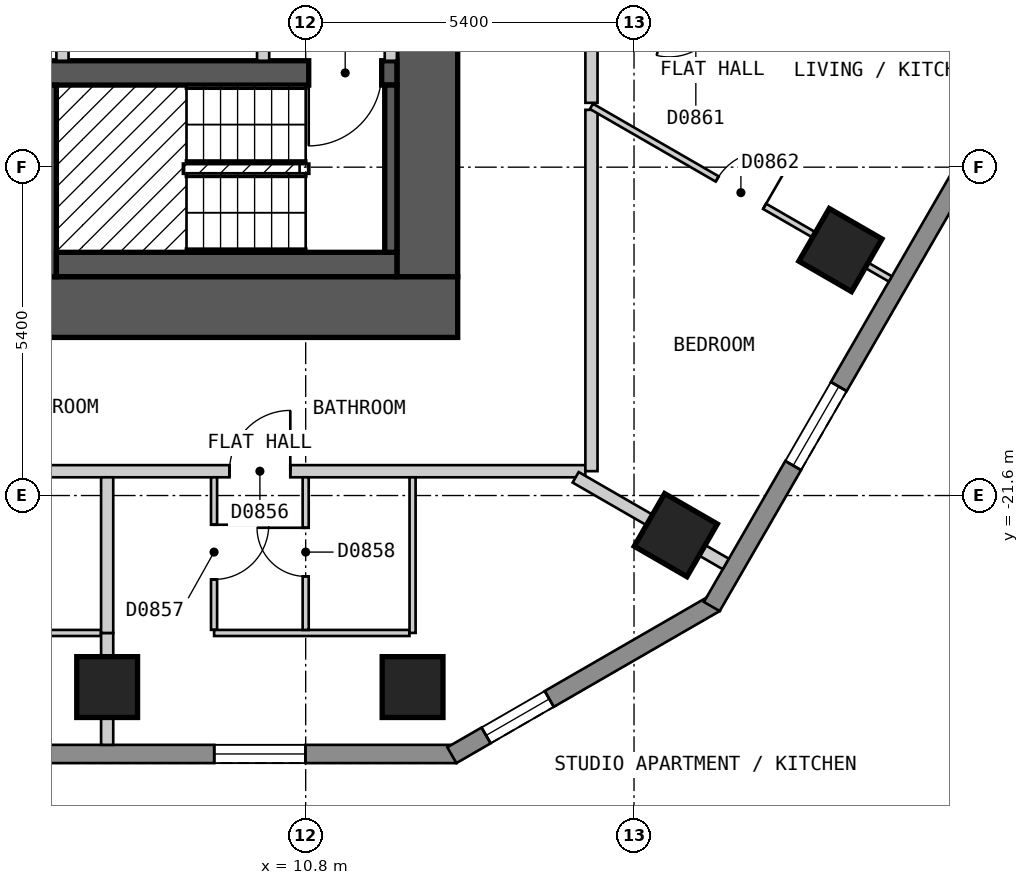
"""IFC4 building model, lengths in metres.
Left out: names, types, materials, properties, quantities, classifications, styles, units other than length and angle.
Written with IfcOpenShell. Run it as: python <this file> out.ifc"""

import sys

from ifc_helpers import new_model, si_unit, direction, frame, frame_2d, origin, origin_2d, place, context, subcontext, project, spatial, polyline, rectangle, outline, extrude, element, fill, save


model = new_model("IFC4")
c1 = context("Model", 3, precision=1e-05, world=origin(), true_north=direction((0.0, 1.0)))
c2 = subcontext(c1, "Body", "Model", "MODEL_VIEW")
j1 = project(units=[si_unit("LENGTHUNIT", "METRE"), si_unit("PLANEANGLEUNIT", "RADIAN")], contexts=[c1])
p1 = place(None, origin())
s1 = spatial("IfcSite", under=j1, at=p1, CompositionType="ELEMENT")
p2 = place(p1, origin())
s2 = spatial("IfcBuilding", under=s1, at=p2, CompositionType="ELEMENT")
p3 = place(p2, frame((0.0, 0.0, 84.0)))
s3 = spatial("IfcBuildingStorey", under=s2, at=p3, CompositionType="ELEMENT", Elevation=84.0)
for number, where, z_axis, x_axis in (
    (1, (7.535, -24.75, 0.0), (0.0, 0.0, 1.0), (1.0, 0.0, 0.0)),
    (2, (12.558, -24.75, 0.0), (0.0, 0.0, 1.0), (1.0, 0.0, 0.0)),
    (3, (16.887, -22.251, 0.0), (0.0, 0.0, 1.0), (0.5, 0.866, 0.0)),
    (4, (19.594, -17.563, 0.0), (0.0, 0.0, 1.0), (0.5, 0.866, 0.0)),
):
    element("IfcColumn", number, at=place(p3, frame(where, z_axis=z_axis, x_axis=x_axis)), inside=s3, PredefinedType="COLUMN", context=c2, shape_type="SweptSolid", body=[
        extrude(rectangle(XDim=1.0, YDim=1.0, at=origin_2d()), origin(), (0.0, 0.0, 1.0), 3.0),
    ])
p4 = place(p3, frame((-13.3, -18.5, 0.0), z_axis=(0.0, 0.0, 1.0), x_axis=(1.0, 0.0, 0.0)))
e5 = element("IfcWall", 5, at=p4, inside=s3, PredefinedType="SHEAR", context=c2, shape_type="SweptSolid", body=[
    extrude(rectangle(XDim=26.6, YDim=1.0, at=frame_2d((13.3, 0.0))), origin(), (0.0, 0.0, 1.0), 2.7),
])
p5 = place(p3, frame((12.8, -18.0, 0.0), z_axis=(0.0, 0.0, 1.0), x_axis=(0.0, 1.0, 0.0)))
e6 = element("IfcWall", 6, at=p5, inside=s3, PredefinedType="SHEAR", context=c2, shape_type="SweptSolid", body=[
    extrude(rectangle(XDim=12.0, YDim=1.0, at=frame_2d((6.0, 0.0))), origin(), (0.0, 0.0, 1.0), 2.7),
])
p6 = place(p3, frame((-12.3, -14.65, 0.0), z_axis=(0.0, 0.0, 1.0), x_axis=(1.0, 0.0, 0.0)))
e7 = element("IfcWall", 7, at=p6, inside=s3, PredefinedType="SHEAR", context=c2, shape_type="SweptSolid", body=[
    extrude(rectangle(XDim=24.6, YDim=0.4, at=frame_2d((12.3, 0.0))), origin(), (0.0, 0.0, 1.0), 2.7),
])
p7 = place(p6, frame((1.5, 0.0, 0.0), z_axis=(0.0, 0.0, 1.0), x_axis=(-1.0, 0.0, 0.0)))
e8 = element("IfcOpeningElement", 8, at=p7, cuts=e7, PredefinedType="OPENING", context=c2, shape_type="SweptSolid", body=[
    extrude(rectangle(XDim=1.2, YDim=2.1, at=frame_2d((0.6, 1.05))), frame((0.0, 0.21, 0.0), z_axis=(0.0, -1.0, 0.0), x_axis=(1.0, 0.0, 0.0)), (0.0, 0.0, 1.0), 0.42),
])
p8 = place(p6, frame((24.35, 0.0, 0.0), z_axis=(0.0, 0.0, 1.0), x_axis=(-1.0, 0.0, 0.0)))
e9 = element("IfcOpeningElement", 9, at=p8, cuts=e7, PredefinedType="OPENING", context=c2, shape_type="SweptSolid", body=[
    extrude(rectangle(XDim=1.2, YDim=2.1, at=frame_2d((0.6, 1.05))), frame((0.0, 0.21, 0.0), z_axis=(0.0, -1.0, 0.0), x_axis=(1.0, 0.0, 0.0)), (0.0, 0.0, 1.0), 0.42),
])
p9 = place(p6, frame((16.45, 0.0, 0.0), z_axis=(0.0, 0.0, 1.0), x_axis=(-1.0, 0.0, 0.0)))
e10 = element("IfcOpeningElement", 10, at=p9, cuts=e7, PredefinedType="OPENING", context=c2, shape_type="SweptSolid", body=[
    extrude(rectangle(XDim=0.9, YDim=2.1, at=frame_2d((0.45, 1.05))), frame((0.0, 0.21, 0.0), z_axis=(0.0, -1.0, 0.0), x_axis=(1.0, 0.0, 0.0)), (0.0, 0.0, 1.0), 0.42),
])
p10 = place(p6, frame((18.25, 0.0, 0.0), z_axis=(0.0, 0.0, 1.0), x_axis=(-1.0, 0.0, 0.0)))
e11 = element("IfcOpeningElement", 11, at=p10, cuts=e7, PredefinedType="OPENING", context=c2, shape_type="SweptSolid", body=[
    extrude(rectangle(XDim=0.9, YDim=2.1, at=frame_2d((0.45, 1.05))), frame((0.0, 0.21, 0.0), z_axis=(0.0, -1.0, 0.0), x_axis=(1.0, 0.0, 0.0)), (0.0, 0.0, 1.0), 0.42),
])
p11 = place(p3, frame((6.5, -18.0, 0.0), z_axis=(0.0, 0.0, 1.0), x_axis=(0.0, 1.0, 0.0)))
e12 = element("IfcWall", 12, at=p11, inside=s3, PredefinedType="SHEAR", context=c2, shape_type="SweptSolid", body=[
    extrude(rectangle(XDim=3.15, YDim=0.4, at=frame_2d((1.575, 0.0))), origin(), (0.0, 0.0, 1.0), 2.7),
])
p12 = place(p3, frame((-13.279, -25.85, 0.0), z_axis=(0.0, 0.0, 1.0), x_axis=(1.0, 0.0, 0.0)))
e13 = element("IfcWall", 13, at=p12, inside=s3, PredefinedType="SOLIDWALL", context=c2, shape_type="SweptSolid", body=[
    extrude(outline(polyline([(0.0, -0.15), (26.558, -0.15), (26.478, 0.15), (0.08, 0.15), (0.0, -0.15)])), origin(), (0.0, 0.0, 1.0), 2.7),
])
p13 = place(p12, frame((2.483, 0.0, 0.15)))
e14 = element("IfcOpeningElement", 14, at=p13, cuts=e13, PredefinedType="OPENING", context=c2, shape_type="SweptSolid", body=[
    extrude(rectangle(XDim=1.5, YDim=2.1, at=frame_2d((0.75, 1.05))), frame((0.0, 0.16, 0.0), z_axis=(0.0, -1.0, 0.0), x_axis=(1.0, 0.0, 0.0)), (0.0, 0.0, 1.0), 0.32),
])
p14 = place(p12, frame((7.507, 0.0, 0.15)))
e15 = element("IfcOpeningElement", 15, at=p14, cuts=e13, PredefinedType="OPENING", context=c2, shape_type="SweptSolid", body=[
    extrude(rectangle(XDim=1.5, YDim=2.1, at=frame_2d((0.75, 1.05))), frame((0.0, 0.16, 0.0), z_axis=(0.0, -1.0, 0.0), x_axis=(1.0, 0.0, 0.0)), (0.0, 0.0, 1.0), 0.32),
])
p15 = place(p12, frame((12.529, 0.0, 0.15)))
e16 = element("IfcOpeningElement", 16, at=p15, cuts=e13, PredefinedType="OPENING", context=c2, shape_type="SweptSolid", body=[
    extrude(rectangle(XDim=1.5, YDim=2.1, at=frame_2d((0.75, 1.05))), frame((0.0, 0.16, 0.0), z_axis=(0.0, -1.0, 0.0), x_axis=(1.0, 0.0, 0.0)), (0.0, 0.0, 1.0), 0.32),
])
p16 = place(p12, frame((17.553, 0.0, 0.15)))
e17 = element("IfcOpeningElement", 17, at=p16, cuts=e13, PredefinedType="OPENING", context=c2, shape_type="SweptSolid", body=[
    extrude(rectangle(XDim=1.5, YDim=2.1, at=frame_2d((0.75, 1.05))), frame((0.0, 0.16, 0.0), z_axis=(0.0, -1.0, 0.0), x_axis=(1.0, 0.0, 0.0)), (0.0, 0.0, 1.0), 0.32),
])
p17 = place(p12, frame((22.575, 0.0, 0.15)))
e18 = element("IfcOpeningElement", 18, at=p17, cuts=e13, PredefinedType="OPENING", context=c2, shape_type="SweptSolid", body=[
    extrude(rectangle(XDim=1.5, YDim=2.1, at=frame_2d((0.75, 1.05))), frame((0.0, 0.16, 0.0), z_axis=(0.0, -1.0, 0.0), x_axis=(1.0, 0.0, 0.0)), (0.0, 0.0, 1.0), 0.32),
])
p18 = place(p3, frame((13.204, -25.87, 0.0), z_axis=(0.0, 0.0, 1.0), x_axis=(0.866010750942, 0.50002537861, 0.0)))
e19 = element("IfcWall", 19, at=p18, inside=s3, PredefinedType="SOLIDWALL", context=c2, shape_type="SweptSolid", body=[
    extrude(outline(polyline([(0.0, -0.15), (5.0, -0.15), (4.919, 0.15), (0.08, 0.15), (0.0, -0.15)])), origin(), (0.0, 0.0, 1.0), 2.7),
])
p19 = place(p18, frame((0.65, 0.0, 0.15)))
e20 = element("IfcOpeningElement", 20, at=p19, cuts=e19, PredefinedType="OPENING", context=c2, shape_type="SweptSolid", body=[
    extrude(rectangle(XDim=1.2, YDim=2.1, at=frame_2d((0.6, 1.05))), frame((0.0, 0.16, 0.0), z_axis=(0.0, -1.0, 0.0), x_axis=(1.0, 0.0, 0.0)), (0.0, 0.0, 1.0), 0.32),
])
p20 = place(p3, frame((17.479, -23.425, 0.0), z_axis=(0.0, 0.0, 1.0), x_axis=(0.500035407905, 0.866004960056, 0.0)))
e21 = element("IfcWall", 21, at=p20, inside=s3, PredefinedType="SOLIDWALL", context=c2, shape_type="SweptSolid", body=[
    extrude(outline(polyline([(0.0, -0.15), (23.094, -0.15), (23.014, 0.15), (0.08, 0.15), (0.0, -0.15)])), origin(), (0.0, 0.0, 1.0), 2.7),
])
p21 = place(p20, frame((2.677, 0.0, 0.15)))
e22 = element("IfcOpeningElement", 22, at=p21, cuts=e21, PredefinedType="OPENING", context=c2, shape_type="SweptSolid", body=[
    extrude(rectangle(XDim=1.5, YDim=2.1, at=frame_2d((0.75, 1.05))), frame((0.0, 0.16, 0.0), z_axis=(0.0, -1.0, 0.0), x_axis=(1.0, 0.0, 0.0)), (0.0, 0.0, 1.0), 0.32),
])
p22 = place(p20, frame((8.091, 0.0, 0.15)))
e23 = element("IfcOpeningElement", 23, at=p22, cuts=e21, PredefinedType="OPENING", context=c2, shape_type="SweptSolid", body=[
    extrude(rectangle(XDim=1.5, YDim=2.1, at=frame_2d((0.75, 1.05))), frame((0.0, 0.16, 0.0), z_axis=(0.0, -1.0, 0.0), x_axis=(1.0, 0.0, 0.0)), (0.0, 0.0, 1.0), 0.32),
])
p23 = place(p20, frame((13.504, 0.0, 0.15)))
e24 = element("IfcOpeningElement", 24, at=p23, cuts=e21, PredefinedType="OPENING", context=c2, shape_type="SweptSolid", body=[
    extrude(rectangle(XDim=1.5, YDim=2.1, at=frame_2d((0.75, 1.05))), frame((0.0, 0.16, 0.0), z_axis=(0.0, -1.0, 0.0), x_axis=(1.0, 0.0, 0.0)), (0.0, 0.0, 1.0), 0.32),
])
p24 = place(p20, frame((18.917, 0.0, 0.15)))
e25 = element("IfcOpeningElement", 25, at=p24, cuts=e21, PredefinedType="OPENING", context=c2, shape_type="SweptSolid", body=[
    extrude(rectangle(XDim=1.5, YDim=2.1, at=frame_2d((0.75, 1.05))), frame((0.0, 0.16, 0.0), z_axis=(0.0, -1.0, 0.0), x_axis=(1.0, 0.0, 0.0)), (0.0, 0.0, 1.0), 0.32),
])
p25 = place(p3, frame((15.5, -13.239, 0.0), z_axis=(0.0, 0.0, 1.0), x_axis=(0.0, -1.0, 0.0)))
e26 = element("IfcWall", 26, at=p25, inside=s3, PredefinedType="PARTITIONING", context=c2, shape_type="SweptSolid", body=[
    extrude(rectangle(XDim=1.903, YDim=0.2, at=frame_2d((0.952, 0.0))), origin(), (0.0, 0.0, 1.0), 2.7),
])
p26 = place(p3, frame((-15.499, -21.2, 0.0), z_axis=(0.0, 0.0, 1.0), x_axis=(1.0, 0.0, 0.0)))
e27 = element("IfcWall", 27, at=p26, inside=s3, PredefinedType="PARTITIONING", context=c2, shape_type="SweptSolid", body=[
    extrude(rectangle(XDim=30.898, YDim=0.2, at=frame_2d((15.449, 0.0))), origin(), (0.0, 0.0, 1.0), 2.7),
])
p27 = place(p26, frame((4.954, 0.0, 0.0)))
e28 = element("IfcOpeningElement", 28, at=p27, cuts=e27, PredefinedType="OPENING", context=c2, shape_type="SweptSolid", body=[
    extrude(rectangle(XDim=1.0, YDim=2.1, at=frame_2d((0.5, 1.05))), frame((0.0, 0.11, 0.0), z_axis=(0.0, -1.0, 0.0), x_axis=(1.0, 0.0, 0.0)), (0.0, 0.0, 1.0), 0.22),
])
p28 = place(p26, frame((20.023, 0.0, 0.0)))
e29 = element("IfcOpeningElement", 29, at=p28, cuts=e27, PredefinedType="OPENING", context=c2, shape_type="SweptSolid", body=[
    extrude(rectangle(XDim=1.0, YDim=2.1, at=frame_2d((0.5, 1.05))), frame((0.0, 0.11, 0.0), z_axis=(0.0, -1.0, 0.0), x_axis=(1.0, 0.0, 0.0)), (0.0, 0.0, 1.0), 0.22),
])
p29 = place(p26, frame((25.046, 0.0, 0.0)))
e30 = element("IfcOpeningElement", 30, at=p29, cuts=e27, PredefinedType="OPENING", context=c2, shape_type="SweptSolid", body=[
    extrude(rectangle(XDim=1.0, YDim=2.1, at=frame_2d((0.5, 1.05))), frame((0.0, 0.11, 0.0), z_axis=(0.0, -1.0, 0.0), x_axis=(1.0, 0.0, 0.0)), (0.0, 0.0, 1.0), 0.22),
])
p30 = place(p3, frame((15.5, -21.199, 0.0), z_axis=(0.0, 0.0, 1.0), x_axis=(0.0, 1.0, 0.0)))
e31 = element("IfcWall", 31, at=p30, inside=s3, PredefinedType="PARTITIONING", context=c2, shape_type="SweptSolid", body=[
    extrude(rectangle(XDim=5.942, YDim=0.2, at=frame_2d((2.971, 0.0))), origin(), (0.0, 0.0, 1.0), 2.7),
])
p31 = place(p3, frame((9.293, -21.3, 0.0), z_axis=(0.0, 0.0, 1.0), x_axis=(0.0, -1.0, 0.0)))
e32 = element("IfcWall", 32, at=p31, inside=s3, PredefinedType="PARTITIONING", context=c2, shape_type="SweptSolid", body=[
    extrude(rectangle(XDim=2.509, YDim=0.1, at=frame_2d((1.254, 0.0))), origin(), (0.0, 0.0, 1.0), 2.7),
])
p32 = place(p31, frame((0.78, 0.0, 0.0)))
e33 = element("IfcOpeningElement", 33, at=p32, cuts=e32, PredefinedType="OPENING", context=c2, shape_type="SweptSolid", body=[
    extrude(rectangle(XDim=0.9, YDim=2.1, at=frame_2d((0.45, 1.05))), frame((0.0, 0.06, 0.0), z_axis=(0.0, -1.0, 0.0), x_axis=(1.0, 0.0, 0.0)), (0.0, 0.0, 1.0), 0.12),
])
p33 = place(p3, frame((15.5, -15.2, 0.0), z_axis=(0.0, 0.0, 1.0), x_axis=(0.866035181374, -0.499983064336, 0.0)))
e34 = element("IfcWall", 34, at=p33, inside=s3, PredefinedType="PARTITIONING", context=c2, shape_type="SweptSolid", body=[
    extrude(rectangle(XDim=5.677, YDim=0.1, at=frame_2d((2.838, 0.0))), origin(), (0.0, 0.0, 1.0), 2.7),
])
p34 = place(p33, frame((2.388, 0.0, 0.0)))
e35 = element("IfcOpeningElement", 35, at=p34, cuts=e34, PredefinedType="OPENING", context=c2, shape_type="SweptSolid", body=[
    extrude(rectangle(XDim=0.9, YDim=2.1, at=frame_2d((0.45, 1.05))), frame((0.0, 0.06, 0.0), z_axis=(0.0, -1.0, 0.0), x_axis=(1.0, 0.0, 0.0)), (0.0, 0.0, 1.0), 0.12),
])
p35 = place(p3, frame((4.271, -23.86, 0.0), z_axis=(0.0, 0.0, 1.0), x_axis=(1.0, 0.0, 0.0)))
e36 = element("IfcWall", 36, at=p35, inside=s3, PredefinedType="PARTITIONING", context=c2, shape_type="SweptSolid", body=[
    extrude(rectangle(XDim=3.164, YDim=0.1, at=frame_2d((1.582, 0.0))), origin(), (0.0, 0.0, 1.0), 2.7),
])
p36 = place(p3, frame((9.294, -23.86, 0.0), z_axis=(0.0, 0.0, 1.0), x_axis=(1.0, 0.0, 0.0)))
e37 = element("IfcWall", 37, at=p36, inside=s3, PredefinedType="PARTITIONING", context=c2, shape_type="SweptSolid", body=[
    extrude(rectangle(XDim=3.213, YDim=0.1, at=frame_2d((1.606, 0.0))), origin(), (0.0, 0.0, 1.0), 2.7),
])
p37 = place(p3, frame((10.8, -23.81, 0.0), z_axis=(0.0, 0.0, 1.0), x_axis=(0.0, 1.0, 0.0)))
e38 = element("IfcWall", 38, at=p37, inside=s3, PredefinedType="PARTITIONING", context=c2, shape_type="SweptSolid", body=[
    extrude(rectangle(XDim=2.51, YDim=0.1, at=frame_2d((1.255, 0.0))), origin(), (0.0, 0.0, 1.0), 2.7),
])
p38 = place(p37, frame((0.88, 0.0, 0.0)))
e39 = element("IfcOpeningElement", 39, at=p38, cuts=e38, PredefinedType="OPENING", context=c2, shape_type="SweptSolid", body=[
    extrude(rectangle(XDim=0.8, YDim=2.1, at=frame_2d((0.4, 1.05))), frame((0.0, 0.06, 0.0), z_axis=(0.0, -1.0, 0.0), x_axis=(1.0, 0.0, 0.0)), (0.0, 0.0, 1.0), 0.12),
])
p39 = place(p3, frame((12.558, -23.859, 0.0), z_axis=(0.0, 0.0, 1.0), x_axis=(0.0, 1.0, 0.0)))
e40 = element("IfcWall", 40, at=p39, inside=s3, PredefinedType="PARTITIONING", context=c2, shape_type="SweptSolid", body=[
    extrude(rectangle(XDim=2.559, YDim=0.1, at=frame_2d((1.279, 0.0))), origin(), (0.0, 0.0, 1.0), 2.7),
])
p40 = place(p3, frame((7.535, -23.86, 0.0), z_axis=(0.0, 0.0, 1.0), x_axis=(0.0, -1.0, 0.0)))
e41 = element("IfcWall", 41, at=p40, inside=s3, PredefinedType="PARTITIONING", context=c2, shape_type="SweptSolid", body=[
    extrude(rectangle(XDim=1.84, YDim=0.2, at=frame_2d((0.92, 0.0))), origin(), (0.0, 0.0, 1.0), 2.7),
])
p41 = place(p3, frame((15.24, -21.3, 0.0), z_axis=(0.0, 0.0, 1.0), x_axis=(0.866090043625, -0.499888023795, 0.0)))
e42 = element("IfcWall", 42, at=p41, inside=s3, PredefinedType="PARTITIONING", context=c2, shape_type="SweptSolid", body=[
    extrude(rectangle(XDim=2.851, YDim=0.2, at=frame_2d((1.425, 0.0))), origin(), (0.0, 0.0, 1.0), 2.7),
])
p42 = place(p3, frame((7.535, -23.86, 0.0), z_axis=(0.0, 0.0, 1.0), x_axis=(0.0, 1.0, 0.0)))
e43 = element("IfcWall", 43, at=p42, inside=s3, PredefinedType="PARTITIONING", context=c2, shape_type="SweptSolid", body=[
    extrude(rectangle(XDim=2.56, YDim=0.2, at=frame_2d((1.28, 0.0))), origin(), (0.0, 0.0, 1.0), 2.7),
])
p43 = place(p3, frame((6.7, -17.8, 0.0), z_axis=(0.0, 0.0, 1.0), x_axis=(1.0, 0.0, 0.0)))
e44 = element("IfcWall", 44, at=p43, inside=s3, PredefinedType="SOLIDWALL", context=c2, shape_type="SweptSolid", body=[
    extrude(rectangle(XDim=5.6, YDim=0.4, at=frame_2d((2.8, 0.0))), origin(), (0.0, 0.0, 1.0), 2.7),
])
p44 = place(p3, frame((6.8, -14.45, 0.0), z_axis=(0.0, 0.0, 1.0), x_axis=(0.0, 1.0, 0.0)))
e45 = element("IfcWall", 45, at=p44, inside=s3, PredefinedType="PARTITIONING", context=c2, shape_type="SweptSolid", body=[
    extrude(rectangle(XDim=2.0, YDim=0.2, at=frame_2d((1.0, 0.0))), origin(), (0.0, 0.0, 1.0), 2.7),
])
p45 = place(p3, frame((10.1, -14.45, 0.0), z_axis=(0.0, 0.0, 1.0), x_axis=(0.0, 1.0, 0.0)))
e46 = element("IfcWall", 46, at=p45, inside=s3, PredefinedType="PARTITIONING", context=c2, shape_type="SweptSolid", body=[
    extrude(rectangle(XDim=1.8, YDim=0.2, at=frame_2d((0.9, 0.0))), origin(), (0.0, 0.0, 1.0), 2.7),
])
p46 = place(p3, frame((12.2, -17.6, 0.0), z_axis=(0.0, 0.0, 1.0), x_axis=(0.0, 1.0, 0.0)))
e47 = element("IfcWall", 47, at=p46, inside=s3, PredefinedType="SOLIDWALL", context=c2, shape_type="SweptSolid", body=[
    extrude(rectangle(XDim=2.75, YDim=0.2, at=frame_2d((1.375, 0.0))), origin(), (0.0, 0.0, 1.0), 2.7),
])
p47 = place(p3, frame((12.2, -14.45, 0.0), z_axis=(0.0, 0.0, 1.0), x_axis=(0.0, 1.0, 0.0)))
e48 = element("IfcWall", 48, at=p47, inside=s3, PredefinedType="PARTITIONING", context=c2, shape_type="SweptSolid", body=[
    extrude(rectangle(XDim=8.25, YDim=0.2, at=frame_2d((4.125, 0.0))), origin(), (0.0, 0.0, 1.0), 2.7),
])
p48 = place(p17, origin())
e49 = element("IfcWindow", 49, at=p48, inside=s3, PartitioningType="SINGLE_PANEL", PredefinedType="WINDOW", context=c2, shape_type="SweptSolid", body=[
    extrude(rectangle(XDim=1.5, YDim=2.1, at=frame_2d((0.75, 1.05))), frame((0.0, 0.03, 0.0), z_axis=(0.0, -1.0, 0.0), x_axis=(1.0, 0.0, 0.0)), (0.0, 0.0, 1.0), 0.06),
])
fill(e18, e49)
p49 = place(p19, origin())
e50 = element("IfcWindow", 50, at=p49, inside=s3, PartitioningType="SINGLE_PANEL", PredefinedType="WINDOW", context=c2, shape_type="SweptSolid", body=[
    extrude(rectangle(XDim=1.2, YDim=2.1, at=frame_2d((0.6, 1.05))), frame((0.0, 0.03, 0.0), z_axis=(0.0, -1.0, 0.0), x_axis=(1.0, 0.0, 0.0)), (0.0, 0.0, 1.0), 0.06),
])
fill(e20, e50)
p50 = place(p21, origin())
e51 = element("IfcWindow", 51, at=p50, inside=s3, PartitioningType="SINGLE_PANEL", PredefinedType="WINDOW", context=c2, shape_type="SweptSolid", body=[
    extrude(rectangle(XDim=1.5, YDim=2.1, at=frame_2d((0.75, 1.05))), frame((0.0, 0.03, 0.0), z_axis=(0.0, -1.0, 0.0), x_axis=(1.0, 0.0, 0.0)), (0.0, 0.0, 1.0), 0.06),
])
fill(e22, e51)
p51 = place(p29, origin())
e52 = element("IfcDoor", 52, at=p51, inside=s3, OperationType="SINGLE_SWING_RIGHT", PredefinedType="DOOR", context=c2, shape_type="SweptSolid", body=[
    extrude(rectangle(XDim=1.0, YDim=2.1, at=frame_2d((0.5, 1.05))), frame((0.0, 0.025, 0.0), z_axis=(0.0, -1.0, 0.0), x_axis=(1.0, 0.0, 0.0)), (0.0, 0.0, 1.0), 0.05),
])
fill(e30, e52)
p52 = place(p32, origin())
e53 = element("IfcDoor", 53, at=p52, inside=s3, OperationType="SINGLE_SWING_LEFT", PredefinedType="DOOR", context=c2, shape_type="SweptSolid", body=[
    extrude(rectangle(XDim=0.9, YDim=2.1, at=frame_2d((0.45, 1.05))), frame((0.0, 0.025, 0.0), z_axis=(0.0, -1.0, 0.0), x_axis=(1.0, 0.0, 0.0)), (0.0, 0.0, 1.0), 0.05),
])
fill(e33, e53)
p53 = place(p38, origin())
e54 = element("IfcDoor", 54, at=p53, inside=s3, OperationType="SINGLE_SWING_RIGHT", PredefinedType="DOOR", context=c2, shape_type="SweptSolid", body=[
    extrude(rectangle(XDim=0.8, YDim=2.1, at=frame_2d((0.4, 1.05))), frame((0.0, 0.025, 0.0), z_axis=(0.0, -1.0, 0.0), x_axis=(1.0, 0.0, 0.0)), (0.0, 0.0, 1.0), 0.05),
])
fill(e39, e54)
p54 = place(p34, origin())
e55 = element("IfcDoor", 55, at=p54, inside=s3, OperationType="SINGLE_SWING_RIGHT", PredefinedType="DOOR", context=c2, shape_type="SweptSolid", body=[
    extrude(rectangle(XDim=0.9, YDim=2.1, at=frame_2d((0.45, 1.05))), frame((0.0, 0.025, 0.0), z_axis=(0.0, -1.0, 0.0), x_axis=(1.0, 0.0, 0.0)), (0.0, 0.0, 1.0), 0.05),
])
fill(e35, e55)
p55 = place(p8, origin())
e56 = element("IfcDoor", 56, at=p55, inside=s3, OperationType="SINGLE_SWING_RIGHT", PredefinedType="DOOR", context=c2, shape_type="SweptSolid", body=[
    extrude(rectangle(XDim=1.2, YDim=2.1, at=frame_2d((0.6, 1.05))), frame((0.0, 0.025, 0.0), z_axis=(0.0, -1.0, 0.0), x_axis=(1.0, 0.0, 0.0)), (0.0, 0.0, 1.0), 0.05),
])
fill(e9, e56)
save(model, sys.argv[1])
